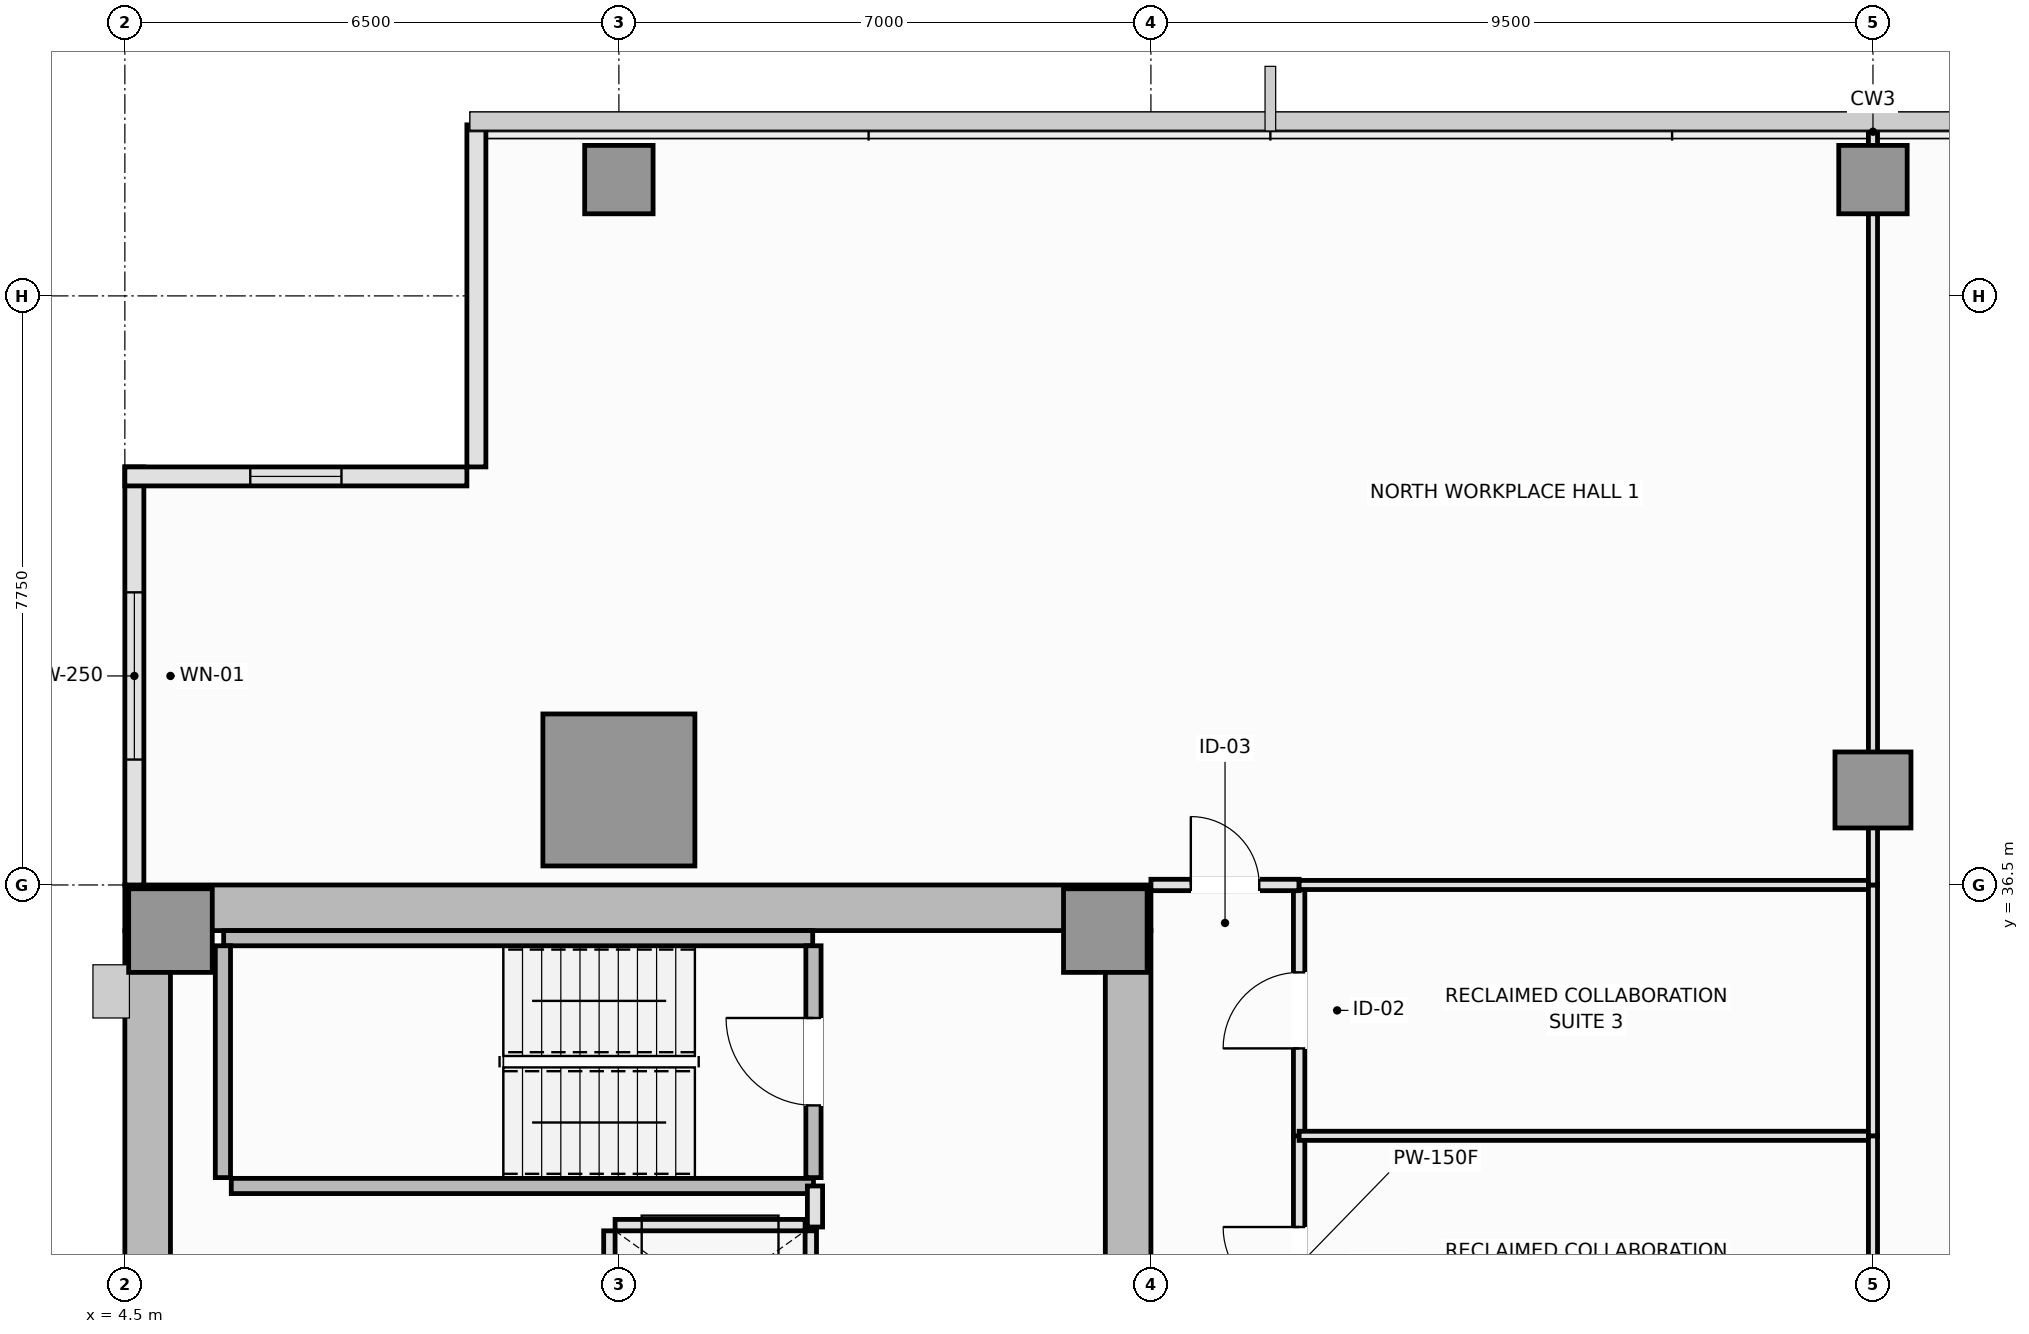
"""IFC4 building model, lengths in metres.
Left out: names, types, materials, properties, quantities, classifications, styles, units other than length and angle.
Written with IfcOpenShell. Run it as: python <this file> out.ifc"""

import sys

from ifc_helpers import new_model, si_unit, direction, frame, frame_2d, origin, origin_2d, place, context, subcontext, project, spatial, rectangle, extrude, element, fill, save


model = new_model("IFC4")
c1 = context("Model", 3, precision=1e-05, world=origin(), true_north=direction((0.0, 1.0)))
c2 = subcontext(c1, "Body", "Model", "MODEL_VIEW")
j1 = project(units=[si_unit("LENGTHUNIT", "METRE"), si_unit("PLANEANGLEUNIT", "RADIAN")], contexts=[c1])
p1 = place(None, origin())
s1 = spatial("IfcSite", under=j1, at=p1, CompositionType="ELEMENT")
p2 = place(p1, origin())
s2 = spatial("IfcBuilding", under=s1, at=p2, CompositionType="ELEMENT")
p3 = place(p2, frame((0.0, 0.0, 127.1)))
s3 = spatial("IfcBuildingStorey", under=s2, at=p3, CompositionType="ELEMENT", Elevation=127.1)
p4 = place(p3, frame((4.5, 36.2, 0.0), z_axis=(0.0, 0.0, 1.0), x_axis=(1.0, 0.0, 0.0)))
e1 = element("IfcWall", 1, at=p4, inside=s3, PredefinedType="SHEAR", context=c2, shape_type="SweptSolid", body=[
    extrude(rectangle(XDim=13.5, YDim=0.6, at=frame_2d((6.75, 0.0))), origin(), (0.0, 0.0, 1.0), 3.55),
])
p5 = place(p3, frame((4.8, 14.6, 0.0), z_axis=(0.0, 0.0, 1.0), x_axis=(0.0, 1.0, 0.0)))
e2 = element("IfcWall", 2, at=p5, inside=s3, PredefinedType="SHEAR", context=c2, shape_type="SweptSolid", body=[
    extrude(rectangle(XDim=21.3, YDim=0.6, at=frame_2d((10.65, 0.0))), origin(), (0.0, 0.0, 1.0), 3.55),
])
p6 = place(p3, frame((17.7, 27.05, 0.0), z_axis=(0.0, 0.0, 1.0), x_axis=(0.0, 1.0, 0.0)))
e3 = element("IfcWall", 3, at=p6, inside=s3, PredefinedType="SHEAR", context=c2, shape_type="SweptSolid", body=[
    extrude(rectangle(XDim=8.85, YDim=0.6, at=frame_2d((4.425, 0.0))), origin(), (0.0, 0.0, 1.0), 3.55),
])
p7 = place(p6, frame((3.45, 0.0, 0.0)))
e4 = element("IfcOpeningElement", 4, at=p7, cuts=e3, PredefinedType="OPENING", context=c2, shape_type="SweptSolid", body=[
    extrude(rectangle(XDim=1.1, YDim=2.15, at=frame_2d((0.55, 1.075))), frame((0.0, 0.31, 0.0), z_axis=(0.0, -1.0, 0.0), x_axis=(1.0, 0.0, 0.0)), (0.0, 0.0, 1.0), 0.62),
])
for number, where, z_axis, x_axis in (
    (5, (5.1, 35.9, 0.0), (0.0, 0.0, 1.0), (1.0, 0.0, 0.0)),
    (6, (17.4, 35.9, 0.0), (0.0, 0.0, 1.0), (1.0, 0.0, 0.0)),
):
    element("IfcColumn", number, at=place(p3, frame(where, z_axis=z_axis, x_axis=x_axis)), inside=s3, PredefinedType="PILASTER", context=c2, shape_type="SweptSolid", body=[
        extrude(rectangle(XDim=1.1, YDim=1.1, at=origin_2d()), origin(), (0.0, 0.0, 1.0), 3.55),
    ])
p8 = place(p3, frame((11.0, 37.75, 0.0), z_axis=(0.0, 0.0, 1.0), x_axis=(1.0, 0.0, 0.0)))
e7 = element("IfcColumn", 7, at=p8, inside=s3, PredefinedType="COLUMN", context=c2, shape_type="SweptSolid", body=[
    extrude(rectangle(XDim=2.0, YDim=2.0, at=origin_2d()), origin(), (0.0, 0.0, 1.0), 3.55),
])
p9 = place(p3, frame((27.5, 37.75, 0.0), z_axis=(0.0, 0.0, 1.0), x_axis=(1.0, 0.0, 0.0)))
e8 = element("IfcColumn", 8, at=p9, inside=s3, PredefinedType="COLUMN", context=c2, shape_type="SweptSolid", body=[
    extrude(rectangle(XDim=1.0, YDim=1.0, at=origin_2d()), origin(), (0.0, 0.0, 1.0), 3.55),
])
for number, where, z_axis, x_axis in (
    (9, (11.0, 45.78, 0.0), (0.0, 0.0, 1.0), (1.0, 0.0, 0.0)),
    (10, (27.5, 45.78, 0.0), (0.0, 0.0, 1.0), (1.0, 0.0, 0.0)),
):
    element("IfcColumn", number, at=place(p3, frame(where, z_axis=z_axis, x_axis=x_axis)), inside=s3, PredefinedType="COLUMN", context=c2, shape_type="SweptSolid", body=[
        extrude(rectangle(XDim=0.9, YDim=0.9, at=origin_2d()), origin(), (0.0, 0.0, 1.0), 3.55),
    ])
p10 = place(p3, frame((4.625, 42.0, 0.0), z_axis=(0.0, 0.0, 1.0), x_axis=(0.0, -1.0, 0.0)))
e11 = element("IfcWall", 11, at=p10, inside=s3, PredefinedType="SOLIDWALL", context=c2, shape_type="SweptSolid", body=[
    extrude(rectangle(XDim=5.5, YDim=0.25, at=frame_2d((2.75, 0.0))), origin(), (0.0, 0.0, 1.0), 3.37),
])
p11 = place(p10, frame((1.65, 0.0, 0.9)))
e12 = element("IfcOpeningElement", 12, at=p11, cuts=e11, PredefinedType="OPENING", context=c2, shape_type="SweptSolid", body=[
    extrude(rectangle(XDim=2.2, YDim=1.8, at=frame_2d((1.1, 0.9))), frame((0.0, 0.135, 0.0), z_axis=(0.0, -1.0, 0.0), x_axis=(1.0, 0.0, 0.0)), (0.0, 0.0, 1.0), 0.27),
])
p12 = place(p3, frame((9.125, 46.5, 0.0), z_axis=(0.0, 0.0, 1.0), x_axis=(0.0, -1.0, 0.0)))
e13 = element("IfcWall", 13, at=p12, inside=s3, PredefinedType="SOLIDWALL", context=c2, shape_type="SweptSolid", body=[
    extrude(rectangle(XDim=4.5, YDim=0.25, at=frame_2d((2.25, 0.0))), origin(), (0.0, 0.0, 1.0), 3.37),
])
p13 = place(p3, frame((9.0, 41.875, 0.0), z_axis=(0.0, 0.0, 1.0), x_axis=(-1.0, 0.0, 0.0)))
e14 = element("IfcWall", 14, at=p13, inside=s3, PredefinedType="SOLIDWALL", context=c2, shape_type="SweptSolid", body=[
    extrude(rectangle(XDim=4.5, YDim=0.25, at=frame_2d((2.25, 0.0))), origin(), (0.0, 0.0, 1.0), 3.37),
])
p14 = place(p13, frame((1.65, 0.0, 0.9)))
e15 = element("IfcOpeningElement", 15, at=p14, cuts=e14, PredefinedType="OPENING", context=c2, shape_type="SweptSolid", body=[
    extrude(rectangle(XDim=1.2, YDim=1.8, at=frame_2d((0.6, 0.9))), frame((0.0, 0.135, 0.0), z_axis=(0.0, -1.0, 0.0), x_axis=(1.0, 0.0, 0.0)), (0.0, 0.0, 1.0), 0.27),
])
p15 = place(p3, frame((5.8, 35.8, 0.0), z_axis=(0.0, 0.0, 1.0), x_axis=(1.0, 0.0, 0.0)))
e16 = element("IfcWall", 16, at=p15, inside=s3, PredefinedType="SOLIDWALL", context=c2, shape_type="SweptSolid", body=[
    extrude(rectangle(XDim=7.75, YDim=0.2, at=frame_2d((3.875, 0.0))), origin(), (0.0, 0.0, 1.0), 3.55),
])
p16 = place(p3, frame((5.79, 32.65, 0.0), z_axis=(0.0, 0.0, 1.0), x_axis=(0.0, 1.0, 0.0)))
e17 = element("IfcWall", 17, at=p16, inside=s3, PredefinedType="SOLIDWALL", context=c2, shape_type="SweptSolid", body=[
    extrude(rectangle(XDim=3.05, YDim=0.2, at=frame_2d((1.525, 0.0))), origin(), (0.0, 0.0, 1.0), 3.55),
])
p17 = place(p3, frame((5.9, 32.54, 0.0), z_axis=(0.0, 0.0, 1.0), x_axis=(1.0, 0.0, 0.0)))
e18 = element("IfcWall", 18, at=p17, inside=s3, PredefinedType="SOLIDWALL", context=c2, shape_type="SweptSolid", body=[
    extrude(rectangle(XDim=7.66, YDim=0.2, at=frame_2d((3.83, 0.0))), origin(), (0.0, 0.0, 1.0), 3.55),
])
p18 = place(p3, frame((13.56, 32.65, 0.0), z_axis=(0.0, 0.0, 1.0), x_axis=(0.0, 1.0, 0.0)))
e19 = element("IfcWall", 19, at=p18, inside=s3, PredefinedType="SOLIDWALL", context=c2, shape_type="SweptSolid", body=[
    extrude(rectangle(XDim=3.05, YDim=0.2, at=frame_2d((1.525, 0.0))), origin(), (0.0, 0.0, 1.0), 3.55),
])
p19 = place(p18, frame((0.95, 0.0, 0.0)))
e20 = element("IfcOpeningElement", 20, at=p19, cuts=e19, PredefinedType="OPENING", context=c2, shape_type="SweptSolid", body=[
    extrude(rectangle(XDim=1.15, YDim=2.15, at=frame_2d((0.575, 1.075))), frame((0.0, 0.11, 0.0), z_axis=(0.0, -1.0, 0.0), x_axis=(1.0, 0.0, 0.0)), (0.0, 0.0, 1.0), 0.22),
])
p20 = place(p3, frame((10.95, 32.025, 0.0), z_axis=(0.0, 0.0, 1.0), x_axis=(1.0, 0.0, 0.0)))
e21 = element("IfcWall", 21, at=p20, inside=s3, PredefinedType="PARTITIONING", context=c2, shape_type="SweptSolid", body=[
    extrude(rectangle(XDim=2.5, YDim=0.15, at=frame_2d((1.25, 0.0))), origin(), (0.0, 0.0, 1.0), 3.37),
])
p21 = place(p3, frame((10.875, 30.15, 0.0), z_axis=(0.0, 0.0, 1.0), x_axis=(0.0, 1.0, 0.0)))
e22 = element("IfcWall", 22, at=p21, inside=s3, PredefinedType="PARTITIONING", context=c2, shape_type="SweptSolid", body=[
    extrude(rectangle(XDim=1.8, YDim=0.15, at=frame_2d((0.9, 0.0))), origin(), (0.0, 0.0, 1.0), 3.37),
])
p22 = place(p3, frame((13.525, 30.15, 0.0), z_axis=(0.0, 0.0, 1.0), x_axis=(0.0, 1.0, 0.0)))
e23 = element("IfcWall", 23, at=p22, inside=s3, PredefinedType="PARTITIONING", context=c2, shape_type="SweptSolid", body=[
    extrude(rectangle(XDim=1.8, YDim=0.15, at=frame_2d((0.9, 0.0))), origin(), (0.0, 0.0, 1.0), 3.37),
])
p23 = place(p22, frame((0.35, 0.0, 0.0)))
e24 = element("IfcOpeningElement", 24, at=p23, cuts=e23, PredefinedType="OPENING", context=c2, shape_type="SweptSolid", body=[
    extrude(rectangle(XDim=1.1, YDim=2.2, at=frame_2d((0.55, 1.1))), frame((0.0, 0.085, 0.0), z_axis=(0.0, -1.0, 0.0), x_axis=(1.0, 0.0, 0.0)), (0.0, 0.0, 1.0), 0.17),
])
p24 = place(p3, frame((13.58, 32.0, 0.0), z_axis=(0.0, 0.0, 1.0), x_axis=(0.0, 1.0, 0.0)))
e25 = element("IfcWall", 25, at=p24, inside=s3, PredefinedType="PARTITIONING", context=c2, shape_type="SweptSolid", body=[
    extrude(rectangle(XDim=0.54, YDim=0.2, at=frame_2d((0.27, 0.0))), origin(), (0.0, 0.0, 1.0), 3.37),
])
p25 = place(p3, frame((19.95, 29.8, 0.0), z_axis=(0.0, 0.0, 1.0), x_axis=(0.0, 1.0, 0.0)))
e26 = element("IfcWall", 26, at=p25, inside=s3, PredefinedType="PARTITIONING", context=c2, shape_type="SweptSolid", body=[
    extrude(rectangle(XDim=3.4, YDim=0.15, at=frame_2d((1.7, 0.0))), origin(), (0.0, 0.0, 1.0), 3.37),
])
p26 = place(p25, frame((1.2, 0.0, 0.0)))
e27 = element("IfcOpeningElement", 27, at=p26, cuts=e26, PredefinedType="OPENING", context=c2, shape_type="SweptSolid", body=[
    extrude(rectangle(XDim=1.0, YDim=2.15, at=frame_2d((0.5, 1.075))), frame((0.0, 0.085, 0.0), z_axis=(0.0, -1.0, 0.0), x_axis=(1.0, 0.0, 0.0)), (0.0, 0.0, 1.0), 0.17),
])
p27 = place(p3, frame((19.95, 33.2, 0.0), z_axis=(0.0, 0.0, 1.0), x_axis=(0.0, 1.0, 0.0)))
e28 = element("IfcWall", 28, at=p27, inside=s3, PredefinedType="PARTITIONING", context=c2, shape_type="SweptSolid", body=[
    extrude(rectangle(XDim=3.3, YDim=0.15, at=frame_2d((1.65, 0.0))), origin(), (0.0, 0.0, 1.0), 3.37),
])
p28 = place(p27, frame((1.15, 0.0, 0.0)))
e29 = element("IfcOpeningElement", 29, at=p28, cuts=e28, PredefinedType="OPENING", context=c2, shape_type="SweptSolid", body=[
    extrude(rectangle(XDim=1.0, YDim=2.15, at=frame_2d((0.5, 1.075))), frame((0.0, 0.085, 0.0), z_axis=(0.0, -1.0, 0.0), x_axis=(1.0, 0.0, 0.0)), (0.0, 0.0, 1.0), 0.17),
])
p29 = place(p3, frame((18.0, 36.5, 0.0), z_axis=(0.0, 0.0, 1.0), x_axis=(1.0, 0.0, 0.0)))
e30 = element("IfcWall", 30, at=p29, inside=s3, PredefinedType="PARTITIONING", context=c2, shape_type="SweptSolid", body=[
    extrude(rectangle(XDim=1.95, YDim=0.15, at=frame_2d((0.975, 0.0))), origin(), (0.0, 0.0, 1.0), 3.37),
])
p30 = place(p29, frame((0.525, 0.0, 0.0)))
e31 = element("IfcOpeningElement", 31, at=p30, cuts=e30, PredefinedType="OPENING", context=c2, shape_type="SweptSolid", body=[
    extrude(rectangle(XDim=0.9, YDim=2.1, at=frame_2d((0.45, 1.05))), frame((0.0, 0.085, 0.0), z_axis=(0.0, -1.0, 0.0), x_axis=(1.0, 0.0, 0.0)), (0.0, 0.0, 1.0), 0.17),
])
p31 = place(p3, frame((19.95, 33.2, 0.0), z_axis=(0.0, 0.0, 1.0), x_axis=(1.0, 0.0, 0.0)))
e32 = element("IfcWall", 32, at=p31, inside=s3, PredefinedType="PARTITIONING", context=c2, shape_type="SweptSolid", body=[
    extrude(rectangle(XDim=7.55, YDim=0.12, at=frame_2d((3.775, 0.0))), origin(), (0.0, 0.0, 1.0), 3.37),
])
p32 = place(p3, frame((27.5, 29.8, 0.0), z_axis=(0.0, 0.0, 1.0), x_axis=(0.0, 1.0, 0.0)))
e33 = element("IfcWall", 33, at=p32, inside=s3, PredefinedType="PARTITIONING", context=c2, shape_type="SweptSolid", body=[
    extrude(rectangle(XDim=3.4, YDim=0.12, at=frame_2d((1.7, 0.0))), origin(), (0.0, 0.0, 1.0), 3.37),
])
p33 = place(p3, frame((19.95, 36.5, 0.0), z_axis=(0.0, 0.0, 1.0), x_axis=(1.0, 0.0, 0.0)))
e34 = element("IfcWall", 34, at=p33, inside=s3, PredefinedType="PARTITIONING", context=c2, shape_type="SweptSolid", body=[
    extrude(rectangle(XDim=7.55, YDim=0.12, at=frame_2d((3.775, 0.0))), origin(), (0.0, 0.0, 1.0), 3.37),
])
p34 = place(p3, frame((27.5, 33.2, 0.0), z_axis=(0.0, 0.0, 1.0), x_axis=(0.0, 1.0, 0.0)))
e35 = element("IfcWall", 35, at=p34, inside=s3, PredefinedType="PARTITIONING", context=c2, shape_type="SweptSolid", body=[
    extrude(rectangle(XDim=3.3, YDim=0.12, at=frame_2d((1.65, 0.0))), origin(), (0.0, 0.0, 1.0), 3.37),
])
p35 = place(p3, frame((27.5, 36.5, 0.0), z_axis=(0.0, 0.0, 1.0), x_axis=(0.0, 1.0, 0.0)))
e36 = element("IfcWall", 36, at=p35, inside=s3, PredefinedType="PARTITIONING", context=c2, shape_type="SweptSolid", body=[
    extrude(rectangle(XDim=9.99, YDim=0.12, at=frame_2d((4.995, 0.0))), origin(), (0.0, 0.0, 1.0), 2.87),
])
p36 = place(p11, origin())
e37 = element("IfcWindow", 37, at=p36, inside=s3, PartitioningType="SINGLE_PANEL", PredefinedType="WINDOW", context=c2, shape_type="SweptSolid", body=[
    extrude(rectangle(XDim=2.2, YDim=1.8, at=frame_2d((1.1, 0.9))), frame((0.0, 0.03, 0.0), z_axis=(0.0, -1.0, 0.0), x_axis=(1.0, 0.0, 0.0)), (0.0, 0.0, 1.0), 0.06),
])
fill(e12, e37)
p37 = place(p14, origin())
e38 = element("IfcWindow", 38, at=p37, inside=s3, PartitioningType="SINGLE_PANEL", PredefinedType="WINDOW", context=c2, shape_type="SweptSolid", body=[
    extrude(rectangle(XDim=1.2, YDim=1.8, at=frame_2d((0.6, 0.9))), frame((0.0, 0.03, 0.0), z_axis=(0.0, -1.0, 0.0), x_axis=(1.0, 0.0, 0.0)), (0.0, 0.0, 1.0), 0.06),
])
fill(e15, e38)
p38 = place(p19, origin())
e39 = element("IfcDoor", 39, at=p38, inside=s3, OperationType="SINGLE_SWING_RIGHT", PredefinedType="DOOR", context=c2, shape_type="SweptSolid", body=[
    extrude(rectangle(XDim=1.15, YDim=2.15, at=frame_2d((0.575, 1.075))), frame((0.0, 0.025, 0.0), z_axis=(0.0, -1.0, 0.0), x_axis=(1.0, 0.0, 0.0)), (0.0, 0.0, 1.0), 0.05),
])
fill(e20, e39)
p39 = place(p26, origin())
e40 = element("IfcDoor", 40, at=p39, inside=s3, OperationType="SINGLE_SWING_RIGHT", PredefinedType="DOOR", context=c2, shape_type="SweptSolid", body=[
    extrude(rectangle(XDim=1.0, YDim=2.15, at=frame_2d((0.5, 1.075))), frame((0.0, 0.025, 0.0), z_axis=(0.0, -1.0, 0.0), x_axis=(1.0, 0.0, 0.0)), (0.0, 0.0, 1.0), 0.05),
])
fill(e27, e40)
p40 = place(p28, origin())
e41 = element("IfcDoor", 41, at=p40, inside=s3, OperationType="SINGLE_SWING_LEFT", PredefinedType="DOOR", context=c2, shape_type="SweptSolid", body=[
    extrude(rectangle(XDim=1.0, YDim=2.15, at=frame_2d((0.5, 1.075))), frame((0.0, 0.025, 0.0), z_axis=(0.0, -1.0, 0.0), x_axis=(1.0, 0.0, 0.0)), (0.0, 0.0, 1.0), 0.05),
])
fill(e29, e41)
p41 = place(p30, origin())
e42 = element("IfcDoor", 42, at=p41, inside=s3, OperationType="SINGLE_SWING_LEFT", PredefinedType="DOOR", context=c2, shape_type="SweptSolid", body=[
    extrude(rectangle(XDim=0.9, YDim=2.1, at=frame_2d((0.45, 1.05))), frame((0.0, 0.025, 0.0), z_axis=(0.0, -1.0, 0.0), x_axis=(1.0, 0.0, 0.0)), (0.0, 0.0, 1.0), 0.05),
])
fill(e31, e42)
save(model, sys.argv[1])
